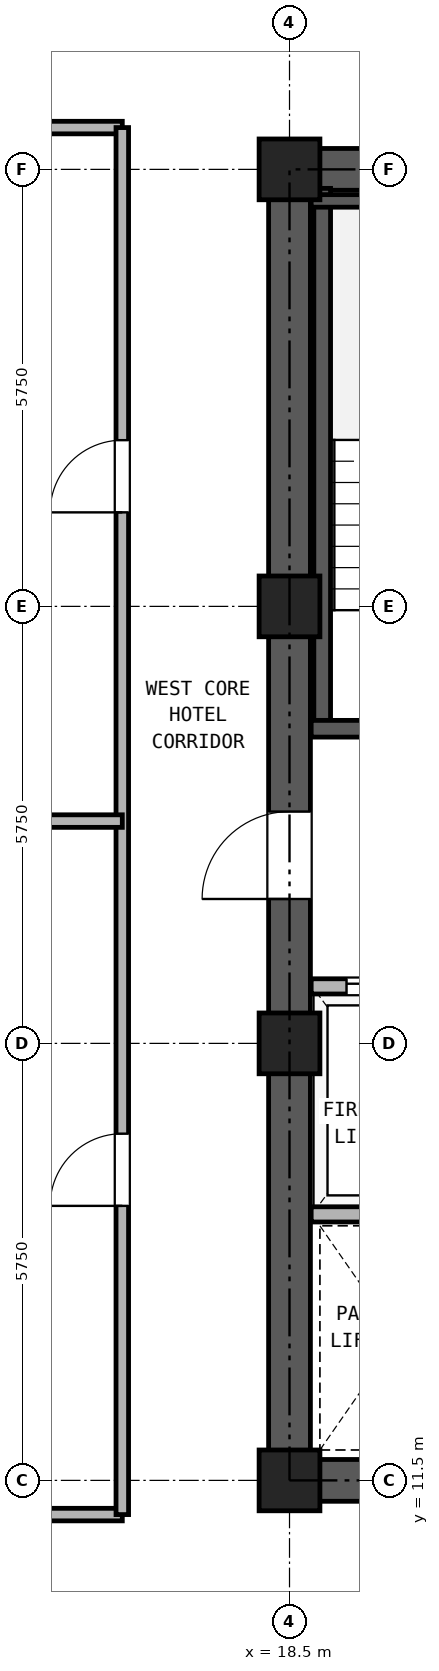
"""IFC4 building model, lengths in metres.
Left out: names, types, materials, properties, quantities, classifications, styles, units other than length and angle.
Written with IfcOpenShell. Run it as: python <this file> out.ifc"""

import sys

from ifc_helpers import new_model, si_unit, direction, frame, frame_2d, origin, origin_2d, place, context, subcontext, project, spatial, rectangle, hollow_rectangle, extrude, source, transform, mapped, element, fill, save


model = new_model("IFC4")
c1 = context("Model", 3, precision=1e-05, world=origin(), true_north=direction((0.0, 1.0)))
c2 = subcontext(c1, "Body", "Model", "MODEL_VIEW")
j1 = project(units=[si_unit("LENGTHUNIT", "METRE"), si_unit("PLANEANGLEUNIT", "RADIAN")], contexts=[c1])
p1 = place(None, origin())
s1 = spatial("IfcSite", under=j1, at=p1, CompositionType="ELEMENT")
p2 = place(p1, origin())
s2 = spatial("IfcBuilding", under=s1, at=p2, CompositionType="ELEMENT")
p3 = place(p2, frame((0.0, 0.0, 92.7)))
s3 = spatial("IfcBuildingStorey", under=s2, at=p3, CompositionType="ELEMENT", Elevation=92.7)
m1 = source(origin(), c2, "Body", "SweptSolid", [
    extrude(hollow_rectangle(XDim=0.8, YDim=0.8, WallThickness=0.045, at=origin_2d()), origin(), (0.0, 0.0, 1.0), 2.95),
])
for number, where, z_axis, x_axis in (
    (1, (18.5, 11.5, 0.0), (0.0, 0.0, 1.0), (1.0, 0.0, 0.0)),
    (2, (18.5, 17.25, 0.0), (0.0, 0.0, 1.0), (1.0, 0.0, 0.0)),
    (3, (18.5, 23.0, 0.0), (0.0, 0.0, 1.0), (1.0, 0.0, 0.0)),
    (4, (18.5, 28.75, 0.0), (0.0, 0.0, 1.0), (1.0, 0.0, 0.0)),
):
    element("IfcColumn", number, at=place(p3, frame(where, z_axis=z_axis, x_axis=x_axis)), inside=s3, PredefinedType="COLUMN", context=c2, shape_type="MappedRepresentation", body=[
        mapped(m1, transform((0.0, 0.0, 0.0), x_axis=(1.0, 0.0, 0.0), y_axis=(0.0, 1.0, 0.0), z_axis=(0.0, 0.0, 1.0), scale=1.0)),
    ])
p4 = place(p3, frame((18.225, 11.5, 0.0), z_axis=(0.0, 0.0, 1.0), x_axis=(1.0, 0.0, 0.0)))
e5 = element("IfcWall", 5, at=p4, inside=s3, PredefinedType="SHEAR", context=c2, shape_type="SweptSolid", body=[
    extrude(rectangle(XDim=10.55, YDim=0.55, at=frame_2d((5.275, 0.0))), origin(), (0.0, 0.0, 1.0), 2.95),
])
p5 = place(p4, frame((5.875, 0.0, 0.0)))
e6 = element("IfcOpeningElement", 6, at=p5, cuts=e5, PredefinedType="OPENING", context=c2, shape_type="SweptSolid", body=[
    extrude(rectangle(XDim=1.1, YDim=2.25, at=frame_2d((0.55, 1.125))), frame((0.0, 0.285, 0.0), z_axis=(0.0, -1.0, 0.0), x_axis=(1.0, 0.0, 0.0)), (0.0, 0.0, 1.0), 0.57),
])
p6 = place(p4, frame((8.275, 0.0, 0.0)))
e7 = element("IfcOpeningElement", 7, at=p6, cuts=e5, PredefinedType="OPENING", context=c2, shape_type="SweptSolid", body=[
    extrude(rectangle(XDim=1.1, YDim=2.25, at=frame_2d((0.55, 1.125))), frame((0.0, 0.285, 0.0), z_axis=(0.0, -1.0, 0.0), x_axis=(1.0, 0.0, 0.0)), (0.0, 0.0, 1.0), 0.57),
])
p7 = place(p3, frame((18.225, 28.75, 0.0), z_axis=(0.0, 0.0, 1.0), x_axis=(1.0, 0.0, 0.0)))
e8 = element("IfcWall", 8, at=p7, inside=s3, PredefinedType="SHEAR", context=c2, shape_type="SweptSolid", body=[
    extrude(rectangle(XDim=10.55, YDim=0.55, at=frame_2d((5.275, 0.0))), origin(), (0.0, 0.0, 1.0), 2.95),
])
p8 = place(p7, frame((4.155, 0.0, 0.0)))
e9 = element("IfcOpeningElement", 9, at=p8, cuts=e8, PredefinedType="OPENING", context=c2, shape_type="SweptSolid", body=[
    extrude(rectangle(XDim=0.9, YDim=2.05, at=frame_2d((0.45, 1.025))), frame((0.0, 0.285, 0.0), z_axis=(0.0, -1.0, 0.0), x_axis=(1.0, 0.0, 0.0)), (0.0, 0.0, 1.0), 0.57),
])
p9 = place(p7, frame((5.695, 0.0, 0.0)))
e10 = element("IfcOpeningElement", 10, at=p9, cuts=e8, PredefinedType="OPENING", context=c2, shape_type="SweptSolid", body=[
    extrude(rectangle(XDim=0.9, YDim=2.05, at=frame_2d((0.45, 1.025))), frame((0.0, 0.285, 0.0), z_axis=(0.0, -1.0, 0.0), x_axis=(1.0, 0.0, 0.0)), (0.0, 0.0, 1.0), 0.57),
])
p10 = place(p3, frame((18.5, 11.775, 0.0), z_axis=(0.0, 0.0, 1.0), x_axis=(0.0, 1.0, 0.0)))
e11 = element("IfcWall", 11, at=p10, inside=s3, PredefinedType="SHEAR", context=c2, shape_type="SweptSolid", body=[
    extrude(rectangle(XDim=16.7, YDim=0.55, at=frame_2d((8.35, 0.0))), origin(), (0.0, 0.0, 1.0), 2.95),
])
p11 = place(p10, frame((7.375, 0.0, 0.0)))
e12 = element("IfcOpeningElement", 12, at=p11, cuts=e11, PredefinedType="OPENING", context=c2, shape_type="SweptSolid", body=[
    extrude(rectangle(XDim=1.15, YDim=2.2, at=frame_2d((0.575, 1.1))), frame((0.0, 0.285, 0.0), z_axis=(0.0, -1.0, 0.0), x_axis=(1.0, 0.0, 0.0)), (0.0, 0.0, 1.0), 0.57),
])
p12 = place(p3, frame((18.93, 21.39, 0.0), z_axis=(0.0, 0.0, 1.0), x_axis=(0.0, 1.0, 0.0)))
e13 = element("IfcWall", 13, at=p12, inside=s3, PredefinedType="SOLIDWALL", context=c2, shape_type="SweptSolid", body=[
    extrude(rectangle(XDim=7.11, YDim=0.22, at=frame_2d((3.555, 0.0))), origin(), (0.0, 0.0, 1.0), 2.95),
])
p13 = place(p3, frame((18.785, 28.335, 0.0), z_axis=(0.0, 0.0, 1.0), x_axis=(1.0, 0.0, 0.0)))
e14 = element("IfcWall", 14, at=p13, inside=s3, PredefinedType="PARTITIONING", context=c2, shape_type="SweptSolid", body=[
    extrude(rectangle(XDim=3.325, YDim=0.165, at=frame_2d((1.663, 0.0))), origin(), (0.0, 0.0, 1.0), 2.95),
])
p14 = place(p3, frame((18.785, 21.39, 0.0), z_axis=(0.0, 0.0, 1.0), x_axis=(1.0, 0.0, 0.0)))
e15 = element("IfcWall", 15, at=p14, inside=s3, PredefinedType="SOLIDWALL", context=c2, shape_type="SweptSolid", body=[
    extrude(rectangle(XDim=6.345, YDim=0.22, at=frame_2d((3.172, 0.0))), origin(), (0.0, 0.0, 1.0), 2.95),
])
p15 = place(p14, frame((1.065, 0.0, 0.0)))
e16 = element("IfcOpeningElement", 16, at=p15, cuts=e15, PredefinedType="OPENING", context=c2, shape_type="SweptSolid", body=[
    extrude(rectangle(XDim=1.15, YDim=2.2, at=frame_2d((0.575, 1.1))), frame((0.0, 0.12, 0.0), z_axis=(0.0, -1.0, 0.0), x_axis=(1.0, 0.0, 0.0)), (0.0, 0.0, 1.0), 0.24),
])
p16 = place(p14, frame((4.795, 0.0, 0.0)))
e17 = element("IfcOpeningElement", 17, at=p16, cuts=e15, PredefinedType="OPENING", context=c2, shape_type="SweptSolid", body=[
    extrude(rectangle(XDim=1.1, YDim=2.25, at=frame_2d((0.55, 1.125))), frame((0.0, 0.12, 0.0), z_axis=(0.0, -1.0, 0.0), x_axis=(1.0, 0.0, 0.0)), (0.0, 0.0, 1.0), 0.24),
])
p17 = place(p3, frame((18.785, 18.0, 0.0), z_axis=(0.0, 0.0, 1.0), x_axis=(1.0, 0.0, 0.0)))
e18 = element("IfcWall", 18, at=p17, inside=s3, PredefinedType="PARTITIONING", context=c2, shape_type="SweptSolid", body=[
    extrude(rectangle(XDim=9.43, YDim=0.2, at=frame_2d((4.715, 0.0))), origin(), (0.0, 0.0, 1.0), 2.95),
])
p18 = place(p17, frame((0.465, 0.0, 0.0)))
e19 = element("IfcOpeningElement", 19, at=p18, cuts=e18, PredefinedType="OPENING", context=c2, shape_type="SweptSolid", body=[
    extrude(rectangle(XDim=1.3, YDim=2.3, at=frame_2d((0.65, 1.15))), frame((0.0, 0.11, 0.0), z_axis=(0.0, -1.0, 0.0), x_axis=(1.0, 0.0, 0.0)), (0.0, 0.0, 1.0), 0.22),
])
p19 = place(p17, frame((2.565, 0.0, 0.0)))
e20 = element("IfcOpeningElement", 20, at=p19, cuts=e18, PredefinedType="OPENING", context=c2, shape_type="SweptSolid", body=[
    extrude(rectangle(XDim=1.3, YDim=2.3, at=frame_2d((0.65, 1.15))), frame((0.0, 0.11, 0.0), z_axis=(0.0, -1.0, 0.0), x_axis=(1.0, 0.0, 0.0)), (0.0, 0.0, 1.0), 0.22),
])
p20 = place(p17, frame((4.965, 0.0, 0.0)))
e21 = element("IfcOpeningElement", 21, at=p20, cuts=e18, PredefinedType="OPENING", context=c2, shape_type="SweptSolid", body=[
    extrude(rectangle(XDim=0.9, YDim=2.05, at=frame_2d((0.45, 1.025))), frame((0.0, 0.11, 0.0), z_axis=(0.0, -1.0, 0.0), x_axis=(1.0, 0.0, 0.0)), (0.0, 0.0, 1.0), 0.22),
])
p21 = place(p17, frame((7.665, 0.0, 0.0)))
e22 = element("IfcOpeningElement", 22, at=p21, cuts=e18, PredefinedType="OPENING", context=c2, shape_type="SweptSolid", body=[
    extrude(rectangle(XDim=0.9, YDim=2.05, at=frame_2d((0.45, 1.025))), frame((0.0, 0.11, 0.0), z_axis=(0.0, -1.0, 0.0), x_axis=(1.0, 0.0, 0.0)), (0.0, 0.0, 1.0), 0.22),
])
p22 = place(p3, frame((18.785, 15.0, 0.0), z_axis=(0.0, 0.0, 1.0), x_axis=(1.0, 0.0, 0.0)))
e23 = element("IfcWall", 23, at=p22, inside=s3, PredefinedType="PARTITIONING", context=c2, shape_type="SweptSolid", body=[
    extrude(rectangle(XDim=9.43, YDim=0.2, at=frame_2d((4.715, 0.0))), origin(), (0.0, 0.0, 1.0), 2.95),
])
for number, where, z_axis, x_axis in (
    (24, (6.8, 11.05, 0.0), (0.0, 0.0, 1.0), (1.0, 0.0, 0.0)),
    (25, (6.8, 29.3, 0.0), (0.0, 0.0, 1.0), (1.0, 0.0, 0.0)),
):
    element("IfcWall", number, at=place(p3, frame(where, z_axis=z_axis, x_axis=x_axis)), inside=s3, PredefinedType="PARTITIONING", context=c2, shape_type="SweptSolid", body=[
        extrude(rectangle(XDim=9.5, YDim=0.165, at=frame_2d((4.75, 0.0))), origin(), (0.0, 0.0, 1.0), 2.95),
    ])
p23 = place(p3, frame((16.3, 11.05, 0.0), z_axis=(0.0, 0.0, 1.0), x_axis=(0.0, 1.0, 0.0)))
e26 = element("IfcWall", 26, at=p23, inside=s3, PredefinedType="PARTITIONING", context=c2, shape_type="SweptSolid", body=[
    extrude(rectangle(XDim=18.25, YDim=0.165, at=frame_2d((9.125, 0.0))), origin(), (0.0, 0.0, 1.0), 2.95),
])
p24 = place(p23, frame((4.062, 0.0, 0.0)))
e27 = element("IfcOpeningElement", 27, at=p24, cuts=e26, PredefinedType="OPENING", context=c2, shape_type="SweptSolid", body=[
    extrude(rectangle(XDim=0.95, YDim=2.15, at=frame_2d((0.475, 1.075))), frame((0.0, 0.093, 0.0), z_axis=(0.0, -1.0, 0.0), x_axis=(1.0, 0.0, 0.0)), (0.0, 0.0, 1.0), 0.185),
])
p25 = place(p23, frame((13.187, 0.0, 0.0)))
e28 = element("IfcOpeningElement", 28, at=p25, cuts=e26, PredefinedType="OPENING", context=c2, shape_type="SweptSolid", body=[
    extrude(rectangle(XDim=0.95, YDim=2.15, at=frame_2d((0.475, 1.075))), frame((0.0, 0.093, 0.0), z_axis=(0.0, -1.0, 0.0), x_axis=(1.0, 0.0, 0.0)), (0.0, 0.0, 1.0), 0.185),
])
p26 = place(p3, frame((0.16, 20.175, 0.0), z_axis=(0.0, 0.0, 1.0), x_axis=(1.0, 0.0, 0.0)))
e29 = element("IfcWall", 29, at=p26, inside=s3, PredefinedType="PARTITIONING", context=c2, shape_type="SweptSolid", body=[
    extrude(rectangle(XDim=16.14, YDim=0.165, at=frame_2d((8.07, 0.0))), origin(), (0.0, 0.0, 1.0), 2.583),
])
p27 = place(p18, origin())
e30 = element("IfcDoor", 30, at=p27, inside=s3, OperationType="DOUBLE_DOOR_SLIDING", PredefinedType="DOOR", context=c2, shape_type="SweptSolid", body=[
    extrude(rectangle(XDim=1.3, YDim=2.3, at=frame_2d((0.65, 1.15))), frame((0.0, 0.025, 0.0), z_axis=(0.0, -1.0, 0.0), x_axis=(1.0, 0.0, 0.0)), (0.0, 0.0, 1.0), 0.05),
])
fill(e19, e30)
p28 = place(p11, frame((1.15, 0.0, 0.0), z_axis=(0.0, 0.0, 1.0), x_axis=(-1.0, 0.0, 0.0)))
e31 = element("IfcDoor", 31, at=p28, inside=s3, OperationType="SINGLE_SWING_LEFT", PredefinedType="DOOR", context=c2, shape_type="SweptSolid", body=[
    extrude(rectangle(XDim=1.15, YDim=2.2, at=frame_2d((0.575, 1.1))), frame((0.0, 0.025, 0.0), z_axis=(0.0, -1.0, 0.0), x_axis=(1.0, 0.0, 0.0)), (0.0, 0.0, 1.0), 0.05),
])
fill(e12, e31)
p29 = place(p24, frame((0.95, 0.0, 0.0), z_axis=(0.0, 0.0, 1.0), x_axis=(-1.0, 0.0, 0.0)))
e32 = element("IfcDoor", 32, at=p29, inside=s3, OperationType="SINGLE_SWING_LEFT", PredefinedType="DOOR", context=c2, shape_type="SweptSolid", body=[
    extrude(rectangle(XDim=0.95, YDim=2.15, at=frame_2d((0.475, 1.075))), frame((0.0, 0.025, 0.0), z_axis=(0.0, -1.0, 0.0), x_axis=(1.0, 0.0, 0.0)), (0.0, 0.0, 1.0), 0.05),
])
fill(e27, e32)
p30 = place(p25, frame((0.95, 0.0, 0.0), z_axis=(0.0, 0.0, 1.0), x_axis=(-1.0, 0.0, 0.0)))
e33 = element("IfcDoor", 33, at=p30, inside=s3, OperationType="SINGLE_SWING_LEFT", PredefinedType="DOOR", context=c2, shape_type="SweptSolid", body=[
    extrude(rectangle(XDim=0.95, YDim=2.15, at=frame_2d((0.475, 1.075))), frame((0.0, 0.025, 0.0), z_axis=(0.0, -1.0, 0.0), x_axis=(1.0, 0.0, 0.0)), (0.0, 0.0, 1.0), 0.05),
])
fill(e28, e33)
save(model, sys.argv[1])
